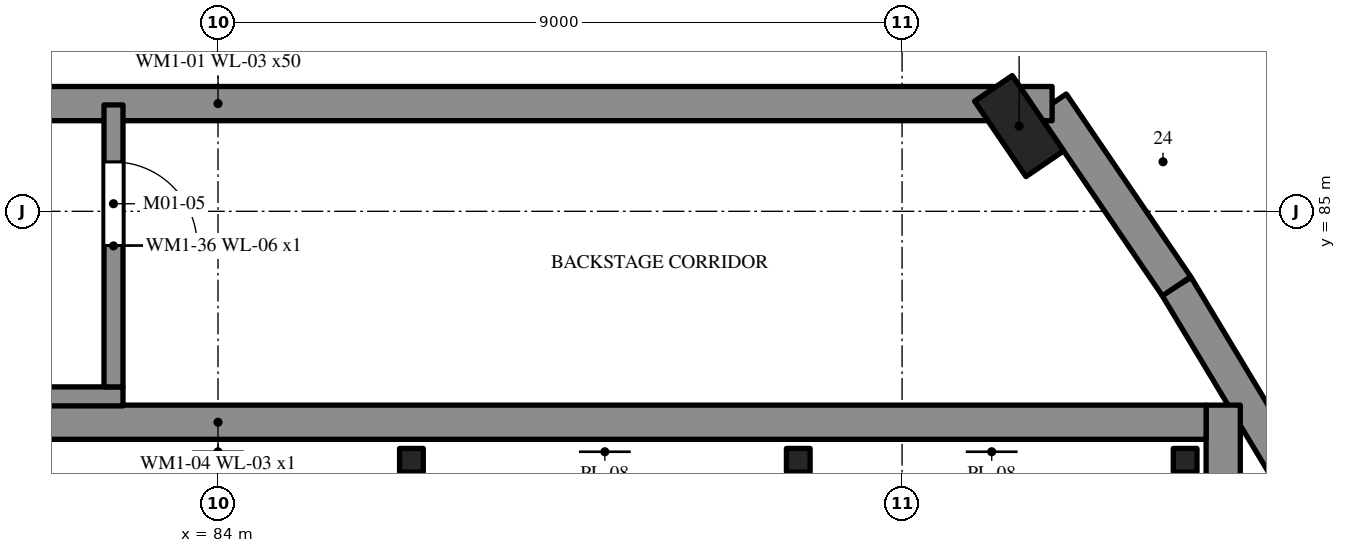
"""IFC4 building model, lengths in metres.
Left out: names, types, materials, properties, quantities, classifications, styles, units other than length and angle.
Written with IfcOpenShell. Run it as: python <this file> out.ifc"""

import sys

from ifc_helpers import new_model, si_unit, direction, frame, frame_2d, origin, origin_2d, place, context, subcontext, project, spatial, rectangle, i_section, extrude, element, fill, save


model = new_model("IFC4")
c1 = context("Model", 3, precision=1e-05, world=origin(), true_north=direction((0.0, 1.0)))
c2 = subcontext(c1, "Body", "Model", "MODEL_VIEW")
j1 = project(units=[si_unit("LENGTHUNIT", "METRE"), si_unit("PLANEANGLEUNIT", "RADIAN")], contexts=[c1])
p1 = place(None, origin())
s1 = spatial("IfcSite", under=j1, at=p1, CompositionType="ELEMENT")
p2 = place(p1, origin())
s2 = spatial("IfcBuilding", under=s1, at=p2, CompositionType="ELEMENT")
p3 = place(p2, frame((0.0, 0.0, 5.4)))
s3 = spatial("IfcBuildingStorey", under=s2, at=p3, CompositionType="ELEMENT", Elevation=5.4)
p4 = place(p3, frame((98.169, 81.425, 0.0), z_axis=(0.0, 0.0, 1.0), x_axis=(-0.515636119523, 0.856807675177, 0.0)))
e1 = element("IfcWall", 1, at=p4, inside=s3, PredefinedType="SOLIDWALL", context=c2, shape_type="SweptSolid", body=[
    extrude(rectangle(XDim=3.021, YDim=0.45, at=frame_2d((1.511, 0.0))), origin(), (0.0, 0.0, 1.0), 4.8),
])
p5 = place(p3, frame((96.611, 84.014, 0.0), z_axis=(0.0, 0.0, 1.0), x_axis=(-0.5629642644, 0.826481238147, 0.0)))
e2 = element("IfcWall", 2, at=p5, inside=s3, PredefinedType="SOLIDWALL", context=c2, shape_type="SweptSolid", body=[
    extrude(rectangle(XDim=2.908, YDim=0.45, at=frame_2d((1.454, 0.0))), origin(), (0.0, 0.0, 1.0), 4.8),
])
p6 = place(p3, frame((94.974, 86.417, 0.0), z_axis=(0.0, 0.0, 1.0), x_axis=(-1.0, 0.0, 0.0)))
e3 = element("IfcWall", 3, at=p6, inside=s3, PredefinedType="SOLIDWALL", context=c2, shape_type="SweptSolid", body=[
    extrude(rectangle(XDim=21.948, YDim=0.45, at=frame_2d((10.974, 0.0))), origin(), (0.0, 0.0, 1.0), 4.8),
])
p7 = place(p3, frame((97.225, 55.4, 0.0), z_axis=(0.0, 0.0, 1.0), x_axis=(0.0, 1.0, 0.0)))
e4 = element("IfcWall", 4, at=p7, inside=s3, PredefinedType="SOLIDWALL", context=c2, shape_type="SweptSolid", body=[
    extrude(rectangle(XDim=27.05, YDim=0.45, at=frame_2d((13.525, 0.0))), origin(), (0.0, 0.0, 1.0), 4.8),
])
p8 = place(p7, frame((21.95, 0.0, 0.0)))
e5 = element("IfcOpeningElement", 5, at=p8, cuts=e4, PredefinedType="OPENING", context=c2, shape_type="SweptSolid", body=[
    extrude(rectangle(XDim=1.3, YDim=2.1, at=frame_2d((0.65, 1.05))), frame((0.0, 0.235, 0.0), z_axis=(0.0, -1.0, 0.0), x_axis=(1.0, 0.0, 0.0)), (0.0, 0.0, 1.0), 0.47),
])
p9 = place(p3, frame((71.0, 82.225, 0.0), z_axis=(0.0, 0.0, 1.0), x_axis=(1.0, 0.0, 0.0)))
e6 = element("IfcWall", 6, at=p9, inside=s3, PredefinedType="SOLIDWALL", context=c2, shape_type="SweptSolid", body=[
    extrude(rectangle(XDim=26.0, YDim=0.45, at=frame_2d((13.0, 0.0))), origin(), (0.0, 0.0, 1.0), 4.8),
])
p10 = place(p3, frame((94.54, 86.122, 0.0), z_axis=(0.0, 0.0, 1.0), x_axis=(-0.562978035902, 0.82647185741, 0.0)))
e7 = element("IfcColumn", 7, at=p10, inside=s3, PredefinedType="PILASTER", context=c2, shape_type="SweptSolid", body=[
    extrude(rectangle(XDim=1.2, YDim=0.6, at=origin_2d()), origin(), (0.0, 0.0, 1.0), 4.8),
])
p11 = place(p3, frame((74.55, 82.565, 0.0), z_axis=(0.0, 0.0, 1.0), x_axis=(1.0, 0.0, 0.0)))
e8 = element("IfcWall", 8, at=p11, inside=s3, PredefinedType="SHEAR", context=c2, shape_type="SweptSolid", body=[
    extrude(rectangle(XDim=8.2, YDim=0.25, at=frame_2d((4.1, 0.0))), origin(), (0.0, 0.0, 1.0), 4.8),
])
p12 = place(p3, frame((82.625, 86.4, 0.0), z_axis=(0.0, 0.0, 1.0), x_axis=(0.0, -1.0, 0.0)))
e9 = element("IfcWall", 9, at=p12, inside=s3, PredefinedType="SHEAR", context=c2, shape_type="SweptSolid", body=[
    extrude(rectangle(XDim=3.71, YDim=0.25, at=frame_2d((1.855, 0.0))), origin(), (0.0, 0.0, 1.0), 4.8),
])
p13 = place(p12, frame((0.75, 0.0, 0.0)))
e10 = element("IfcOpeningElement", 10, at=p13, cuts=e9, PredefinedType="OPENING", context=c2, shape_type="SweptSolid", body=[
    extrude(rectangle(XDim=1.1, YDim=2.1, at=frame_2d((0.55, 1.05))), frame((0.0, 0.135, 0.0), z_axis=(0.0, -1.0, 0.0), x_axis=(1.0, 0.0, 0.0)), (0.0, 0.0, 1.0), 0.27),
])
for number, where, z_axis, x_axis in (
    (11, (86.545, 81.724, 0.0), (0.0, 0.0, 1.0), (1.0, 0.0, 0.0)),
    (12, (91.635, 81.724, 0.0), (0.0, 0.0, 1.0), (1.0, 0.0, 0.0)),
    (13, (96.724, 81.724, 0.0), (0.0, 0.0, 1.0), (1.0, 0.0, 0.0)),
):
    element("IfcColumn", number, at=place(p3, frame(where, z_axis=z_axis, x_axis=x_axis)), inside=s3, PredefinedType="COLUMN", context=c2, shape_type="SweptSolid", body=[
        extrude(i_section(OverallWidth=0.312, OverallDepth=0.312, WebThickness=0.017, FlangeThickness=0.017, FilletRadius=0.016, at=origin_2d()), origin(), (0.0, 0.0, 1.0), 4.8),
    ])
p14 = place(p13, origin())
e14 = element("IfcDoor", 14, at=p14, inside=s3, OperationType="SINGLE_SWING_RIGHT", PredefinedType="DOOR", context=c2, shape_type="SweptSolid", body=[
    extrude(rectangle(XDim=1.1, YDim=2.1, at=frame_2d((0.55, 1.05))), frame((0.0, 0.025, 0.0), z_axis=(0.0, -1.0, 0.0), x_axis=(1.0, 0.0, 0.0)), (0.0, 0.0, 1.0), 0.05),
])
fill(e10, e14)
save(model, sys.argv[1])
